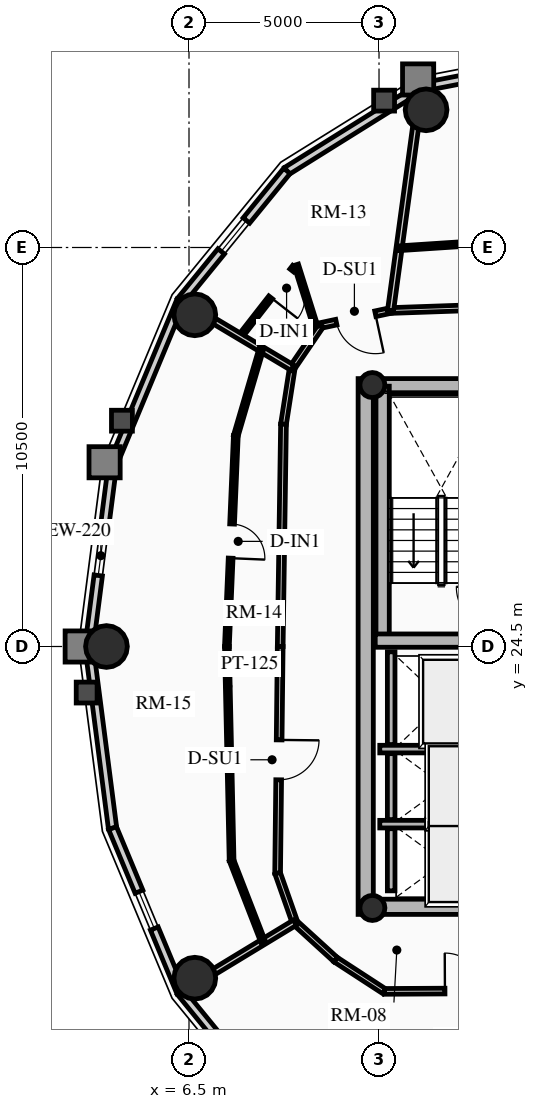
"""IFC4 building model, lengths in metres.
Left out: names, types, materials, properties, quantities, classifications, styles, units other than length and angle.
Written with IfcOpenShell. Run it as: python <this file> out.ifc"""

import sys

from ifc_helpers import new_model, si_unit, direction, frame, frame_2d, origin, origin_2d, place, context, subcontext, project, spatial, rectangle, circle, hollow_circle, extrude, source, transform, mapped, element, fill, save


model = new_model("IFC4")
c1 = context("Model", 3, precision=1e-05, world=origin(), true_north=direction((0.0, 1.0)))
c2 = subcontext(c1, "Body", "Model", "MODEL_VIEW")
j1 = project(units=[si_unit("LENGTHUNIT", "METRE"), si_unit("PLANEANGLEUNIT", "RADIAN")], contexts=[c1])
p1 = place(None, origin())
s1 = spatial("IfcSite", under=j1, at=p1, CompositionType="ELEMENT")
p2 = place(p1, origin())
s2 = spatial("IfcBuilding", under=s1, at=p2, CompositionType="ELEMENT")
p3 = place(p2, frame((0.0, 0.0, 214.12)))
s3 = spatial("IfcBuildingStorey", under=s2, at=p3, CompositionType="ELEMENT", Elevation=214.12)
p4 = place(p3, frame((11.15, 17.45, 0.0), z_axis=(0.0, 0.0, 1.0), x_axis=(0.0, 1.0, 0.0)))
e1 = element("IfcWall", 1, at=p4, inside=s3, PredefinedType="SHEAR", context=c2, shape_type="SweptSolid", body=[
    extrude(rectangle(XDim=14.1, YDim=0.4, at=frame_2d((7.05, 0.0))), origin(), (0.0, 0.0, 1.0), 2.91),
])
p5 = place(p3, frame((11.15, 17.65, 0.0), z_axis=(0.0, 0.0, 1.0), x_axis=(1.0, 0.0, 0.0)))
e2 = element("IfcWall", 2, at=p5, inside=s3, PredefinedType="SHEAR", context=c2, shape_type="SweptSolid", body=[
    extrude(rectangle(XDim=10.7, YDim=0.4, at=frame_2d((5.35, 0.0))), origin(), (0.0, 0.0, 1.0), 2.91),
])
m1 = source(origin(), c2, "Body", "SweptSolid", [
    extrude(rectangle(XDim=1.5, YDim=2.02, at=frame_2d((0.75, 1.01))), frame((0.0, 0.21, 0.0), z_axis=(0.0, -1.0, 0.0), x_axis=(1.0, 0.0, 0.0)), (0.0, 0.0, 1.0), 0.42),
])
p6 = place(p5, frame((5.45, 0.0, 0.0)))
e3 = element("IfcOpeningElement", 3, at=p6, cuts=e2, PredefinedType="OPENING", context=c2, shape_type="MappedRepresentation", body=[
    mapped(m1, transform((0.0, 0.0, 0.0), x_axis=(1.0, 0.0, 0.0), y_axis=(0.0, 1.0, 0.0), z_axis=(0.0, 0.0, 1.0), scale=1.0)),
])
p7 = place(p3, frame((11.15, 31.35, 0.0), z_axis=(0.0, 0.0, 1.0), x_axis=(1.0, 0.0, 0.0)))
e4 = element("IfcWall", 4, at=p7, inside=s3, PredefinedType="SHEAR", context=c2, shape_type="SweptSolid", body=[
    extrude(rectangle(XDim=10.7, YDim=0.4, at=frame_2d((5.35, 0.0))), origin(), (0.0, 0.0, 1.0), 2.91),
])
p8 = place(p7, frame((4.6, 0.0, 0.0)))
e5 = element("IfcOpeningElement", 5, at=p8, cuts=e4, PredefinedType="OPENING", context=c2, shape_type="MappedRepresentation", body=[
    mapped(m1, transform((0.0, 0.0, 0.0), x_axis=(1.0, 0.0, 0.0), y_axis=(0.0, 1.0, 0.0), z_axis=(0.0, 0.0, 1.0), scale=1.0)),
])
p9 = place(p3, frame((11.595, 24.655, 0.0), z_axis=(0.0, 0.0, 1.0), x_axis=(0.0, 1.0, 0.0)))
e6 = element("IfcWall", 6, at=p9, inside=s3, PredefinedType="SHEAR", context=c2, shape_type="SweptSolid", body=[
    extrude(rectangle(XDim=6.695, YDim=0.35, at=frame_2d((3.348, 0.0))), origin(), (0.0, 0.0, 1.0), 2.91),
])
p10 = place(p3, frame((11.4, 24.655, 0.0), z_axis=(0.0, 0.0, 1.0), x_axis=(1.0, 0.0, 0.0)))
e7 = element("IfcWall", 7, at=p10, inside=s3, PredefinedType="SHEAR", context=c2, shape_type="SweptSolid", body=[
    extrude(rectangle(XDim=3.285, YDim=0.35, at=frame_2d((1.643, 0.0))), origin(), (0.0, 0.0, 1.0), 2.91),
])
for number, where, z_axis, x_axis in (
    (8, (11.325, 17.62, 0.0), (0.0, 0.0, 1.0), (1.0, 0.0, 0.0)),
    (9, (11.325, 31.38, 0.0), (0.0, 0.0, 1.0), (1.0, 0.0, 0.0)),
):
    element("IfcColumn", number, at=place(p3, frame(where, z_axis=z_axis, x_axis=x_axis)), inside=s3, PredefinedType="COLUMN", context=c2, shape_type="SweptSolid", body=[
        extrude(hollow_circle(Radius=0.33, WallThickness=0.025, at=origin_2d()), origin(), (0.0, 0.0, 1.0), 2.91),
    ])
for number, where, z_axis, x_axis in (
    (10, (12.739, 38.623, 0.0), (0.0, 0.0, 1.0), (1.0, 0.0, 0.0)),
    (11, (6.653, 33.229, 0.0), (0.0, 0.0, 1.0), (1.0, 0.0, 0.0)),
    (12, (4.328, 24.5, 0.0), (0.0, 0.0, 1.0), (1.0, 0.0, 0.0)),
    (13, (6.653, 15.771, 0.0), (0.0, 0.0, 1.0), (1.0, 0.0, 0.0)),
):
    element("IfcColumn", number, at=place(p3, frame(where, z_axis=z_axis, x_axis=x_axis)), inside=s3, PredefinedType="USERDEFINED", context=c2, shape_type="SweptSolid", body=[
        extrude(circle(Radius=0.55, at=origin_2d()), origin(), (0.0, 0.0, 1.0), 2.91),
    ])
p11 = place(p3, frame((12.597, 39.213, 0.0), z_axis=(0.0, 0.0, 1.0), x_axis=(0.981700307484, 0.190432419211, 0.0)))
e14 = element("IfcWall", 14, at=p11, inside=s3, PredefinedType="SOLIDWALL", context=c2, shape_type="SweptSolid", body=[
    extrude(rectangle(XDim=3.976, YDim=0.22, at=frame_2d((1.988, 0.0))), origin(), (0.0, 0.0, 1.0), 2.322),
])
m2 = source(origin(), c2, "Body", "SweptSolid", [
    extrude(rectangle(XDim=1.05, YDim=1.3, at=frame_2d((0.525, 0.65))), frame((0.0, 0.12, 0.0), z_axis=(0.0, -1.0, 0.0), x_axis=(1.0, 0.0, 0.0)), (0.0, 0.0, 1.0), 0.24),
])
p12 = place(p11, frame((1.463, 0.0, 0.65)))
e15 = element("IfcOpeningElement", 15, at=p12, cuts=e14, PredefinedType="OPENING", context=c2, shape_type="MappedRepresentation", body=[
    mapped(m2, transform((0.0, 0.0, 0.0), x_axis=(1.0, 0.0, 0.0), y_axis=(0.0, 1.0, 0.0), z_axis=(0.0, 0.0, 1.0), scale=1.0)),
])
p13 = place(p3, frame((9.076, 37.015, 0.0), z_axis=(0.0, 0.0, 1.0), x_axis=(0.848318713376, 0.529485939886, 0.0)))
e16 = element("IfcWall", 16, at=p13, inside=s3, PredefinedType="SOLIDWALL", context=c2, shape_type="SweptSolid", body=[
    extrude(rectangle(XDim=4.15, YDim=0.22, at=frame_2d((2.075, 0.0))), origin(), (0.0, 0.0, 1.0), 2.322),
])
p14 = place(p3, frame((6.282, 33.593, 0.0), z_axis=(0.0, 0.0, 1.0), x_axis=(0.632467166636, 0.774587169483, 0.0)))
e17 = element("IfcWall", 17, at=p14, inside=s3, PredefinedType="SOLIDWALL", context=c2, shape_type="SweptSolid", body=[
    extrude(rectangle(XDim=4.418, YDim=0.22, at=frame_2d((2.209, 0.0))), origin(), (0.0, 0.0, 1.0), 2.322),
])
p15 = place(p14, frame((1.684, 0.0, 0.65)))
e18 = element("IfcOpeningElement", 18, at=p15, cuts=e17, PredefinedType="OPENING", context=c2, shape_type="MappedRepresentation", body=[
    mapped(m2, transform((0.0, 0.0, 0.0), x_axis=(1.0, 0.0, 0.0), y_axis=(0.0, 1.0, 0.0), z_axis=(0.0, 0.0, 1.0), scale=1.0)),
])
p16 = place(p3, frame((4.488, 29.281, 0.0), z_axis=(0.0, 0.0, 1.0), x_axis=(0.384036305194, 0.923317993052, 0.0)))
e19 = element("IfcWall", 19, at=p16, inside=s3, PredefinedType="SOLIDWALL", context=c2, shape_type="SweptSolid", body=[
    extrude(rectangle(XDim=4.671, YDim=0.22, at=frame_2d((2.335, 0.0))), origin(), (0.0, 0.0, 1.0), 2.322),
])
p17 = place(p3, frame((3.87, 24.5, 0.0), z_axis=(0.0, 0.0, 1.0), x_axis=(0.128241318541, 0.991742993027, 0.0)))
e20 = element("IfcWall", 20, at=p17, inside=s3, PredefinedType="SOLIDWALL", context=c2, shape_type="SweptSolid", body=[
    extrude(rectangle(XDim=4.82, YDim=0.22, at=frame_2d((2.41, 0.0))), origin(), (0.0, 0.0, 1.0), 2.322),
])
p18 = place(p17, frame((1.885, 0.0, 0.65)))
e21 = element("IfcOpeningElement", 21, at=p18, cuts=e20, PredefinedType="OPENING", context=c2, shape_type="MappedRepresentation", body=[
    mapped(m2, transform((0.0, 0.0, 0.0), x_axis=(1.0, 0.0, 0.0), y_axis=(0.0, 1.0, 0.0), z_axis=(0.0, 0.0, 1.0), scale=1.0)),
])
p19 = place(p3, frame((4.488, 19.719, 0.0), z_axis=(0.0, 0.0, 1.0), x_axis=(-0.128241318541, 0.991742993027, 0.0)))
e22 = element("IfcWall", 22, at=p19, inside=s3, PredefinedType="SOLIDWALL", context=c2, shape_type="SweptSolid", body=[
    extrude(rectangle(XDim=4.82, YDim=0.22, at=frame_2d((2.41, 0.0))), origin(), (0.0, 0.0, 1.0), 2.322),
])
p20 = place(p3, frame((6.282, 15.407, 0.0), z_axis=(0.0, 0.0, 1.0), x_axis=(-0.384036305194, 0.923317993052, 0.0)))
e23 = element("IfcWall", 23, at=p20, inside=s3, PredefinedType="SOLIDWALL", context=c2, shape_type="SweptSolid", body=[
    extrude(rectangle(XDim=4.671, YDim=0.22, at=frame_2d((2.335, 0.0))), origin(), (0.0, 0.0, 1.0), 2.322),
])
p21 = place(p20, frame((1.81, 0.0, 0.65)))
e24 = element("IfcOpeningElement", 24, at=p21, cuts=e23, PredefinedType="OPENING", context=c2, shape_type="MappedRepresentation", body=[
    mapped(m2, transform((0.0, 0.0, 0.0), x_axis=(1.0, 0.0, 0.0), y_axis=(0.0, 1.0, 0.0), z_axis=(0.0, 0.0, 1.0), scale=1.0)),
])
p22 = place(p3, frame((9.076, 11.985, 0.0), z_axis=(0.0, 0.0, 1.0), x_axis=(-0.632467166636, 0.774587169483, 0.0)))
e25 = element("IfcWall", 25, at=p22, inside=s3, PredefinedType="SOLIDWALL", context=c2, shape_type="SweptSolid", body=[
    extrude(rectangle(XDim=4.418, YDim=0.22, at=frame_2d((2.209, 0.0))), origin(), (0.0, 0.0, 1.0), 2.322),
])
p23 = place(p3, frame((11.52, 21.8, 0.0), z_axis=(0.0, 0.0, 1.0), x_axis=(1.0, 0.0, 0.0)))
e26 = element("IfcWall", 26, at=p23, inside=s3, PredefinedType="SHEAR", context=c2, shape_type="SweptSolid", body=[
    extrude(rectangle(XDim=2.97, YDim=0.2, at=frame_2d((1.485, 0.0))), origin(), (0.0, 0.0, 1.0), 2.91),
])
p24 = place(p3, frame((11.82, 21.92, 0.0), z_axis=(0.0, 0.0, 1.0), x_axis=(0.0, 1.0, 0.0)))
e27 = element("IfcWall", 27, at=p24, inside=s3, PredefinedType="SHEAR", context=c2, shape_type="SweptSolid", body=[
    extrude(rectangle(XDim=2.44, YDim=0.2, at=frame_2d((1.22, 0.0))), origin(), (0.0, 0.0, 1.0), 2.91),
])
p25 = place(p3, frame((11.52, 19.825, 0.0), z_axis=(0.0, 0.0, 1.0), x_axis=(1.0, 0.0, 0.0)))
e28 = element("IfcWall", 28, at=p25, inside=s3, PredefinedType="SHEAR", context=c2, shape_type="SweptSolid", body=[
    extrude(rectangle(XDim=2.97, YDim=0.2, at=frame_2d((1.485, 0.0))), origin(), (0.0, 0.0, 1.0), 2.91),
])
p26 = place(p3, frame((11.82, 19.945, 0.0), z_axis=(0.0, 0.0, 1.0), x_axis=(0.0, 1.0, 0.0)))
e29 = element("IfcWall", 29, at=p26, inside=s3, PredefinedType="SHEAR", context=c2, shape_type="SweptSolid", body=[
    extrude(rectangle(XDim=1.735, YDim=0.2, at=frame_2d((0.867, 0.0))), origin(), (0.0, 0.0, 1.0), 2.91),
])
p27 = place(p3, frame((11.82, 18.07, 0.0), z_axis=(0.0, 0.0, 1.0), x_axis=(0.0, 1.0, 0.0)))
e30 = element("IfcWall", 30, at=p27, inside=s3, PredefinedType="SHEAR", context=c2, shape_type="SweptSolid", body=[
    extrude(rectangle(XDim=1.635, YDim=0.2, at=frame_2d((0.817, 0.0))), origin(), (0.0, 0.0, 1.0), 2.91),
])
p28 = place(p3, frame((18.082, 33.56, 0.0), z_axis=(0.0, 0.0, 1.0), x_axis=(-0.999399009709, -0.034664382185, 0.0)))
e31 = element("IfcWall", 31, at=p28, inside=s3, PredefinedType="PARTITIONING", context=c2, shape_type="SweptSolid", body=[
    extrude(rectangle(XDim=6.282, YDim=0.15, at=frame_2d((3.141, 0.0))), origin(), (0.0, 0.0, 1.0), 2.255),
])
p29 = place(p3, frame((11.803, 33.342, 0.0), z_axis=(0.0, 0.0, 1.0), x_axis=(-0.977750742783, -0.209770076483, 0.0)))
e32 = element("IfcWall", 32, at=p29, inside=s3, PredefinedType="PARTITIONING", context=c2, shape_type="SweptSolid", body=[
    extrude(rectangle(XDim=1.868, YDim=0.15, at=frame_2d((0.934, 0.0))), origin(), (0.0, 0.0, 1.0), 2.255),
])
m3 = source(origin(), c2, "Body", "SweptSolid", [
    extrude(rectangle(XDim=1.05, YDim=2.015, at=frame_2d((0.525, 1.007))), frame((0.0, 0.085, 0.0), z_axis=(0.0, -1.0, 0.0), x_axis=(1.0, 0.0, 0.0)), (0.0, 0.0, 1.0), 0.17),
])
p30 = place(p29, frame((0.409, 0.0, 0.0)))
e33 = element("IfcOpeningElement", 33, at=p30, cuts=e32, PredefinedType="OPENING", context=c2, shape_type="MappedRepresentation", body=[
    mapped(m3, transform((0.0, 0.0, 0.0), x_axis=(1.0, 0.0, 0.0), y_axis=(0.0, 1.0, 0.0), z_axis=(0.0, 0.0, 1.0), scale=1.0)),
])
p31 = place(p3, frame((9.977, 32.95, 0.0), z_axis=(0.0, 0.0, 1.0), x_axis=(-0.563291804539, -0.826258036535, 0.0)))
e34 = element("IfcWall", 34, at=p31, inside=s3, PredefinedType="PARTITIONING", context=c2, shape_type="SweptSolid", body=[
    extrude(rectangle(XDim=1.346, YDim=0.15, at=frame_2d((0.673, 0.0))), origin(), (0.0, 0.0, 1.0), 2.322),
])
p32 = place(p3, frame((9.219, 31.838, 0.0), z_axis=(0.0, 0.0, 1.0), x_axis=(-0.154065528966, -0.98806063214, 0.0)))
e35 = element("IfcWall", 35, at=p32, inside=s3, PredefinedType="PARTITIONING", context=c2, shape_type="SweptSolid", body=[
    extrude(rectangle(XDim=1.507, YDim=0.15, at=frame_2d((0.753, 0.0))), origin(), (0.0, 0.0, 1.0), 2.255),
])
p33 = place(p3, frame((8.986, 30.349, 0.0), z_axis=(0.0, 0.0, 1.0), x_axis=(-0.014775478218, -0.999890836663, 0.0)))
e36 = element("IfcWall", 36, at=p33, inside=s3, PredefinedType="PARTITIONING", context=c2, shape_type="SweptSolid", body=[
    extrude(rectangle(XDim=5.849, YDim=0.15, at=frame_2d((2.925, 0.0))), origin(), (0.0, 0.0, 1.0), 2.685),
])
p34 = place(p3, frame((8.9, 24.5, 0.0), z_axis=(0.0, 0.0, 1.0), x_axis=(-0.011416369353, -0.999934831132, 0.0)))
e37 = element("IfcWall", 37, at=p34, inside=s3, PredefinedType="PARTITIONING", context=c2, shape_type="SweptSolid", body=[
    extrude(rectangle(XDim=5.967, YDim=0.15, at=frame_2d((2.983, 0.0))), origin(), (0.0, 0.0, 1.0), 2.322),
])
p35 = place(p34, frame((2.458, 0.0, 0.0)))
e38 = element("IfcOpeningElement", 38, at=p35, cuts=e37, PredefinedType="OPENING", context=c2, shape_type="MappedRepresentation", body=[
    mapped(m3, transform((0.0, 0.0, 0.0), x_axis=(1.0, 0.0, 0.0), y_axis=(0.0, 1.0, 0.0), z_axis=(0.0, 0.0, 1.0), scale=1.0)),
])
p36 = place(p3, frame((8.832, 18.534, 0.0), z_axis=(0.0, 0.0, 1.0), x_axis=(0.332031819657, -0.943268186008, 0.0)))
e39 = element("IfcWall", 39, at=p36, inside=s3, PredefinedType="PARTITIONING", context=c2, shape_type="SweptSolid", body=[
    extrude(rectangle(XDim=1.377, YDim=0.15, at=frame_2d((0.688, 0.0))), origin(), (0.0, 0.0, 1.0), 2.255),
])
p37 = place(p3, frame((9.289, 17.235, 0.0), z_axis=(0.0, 0.0, 1.0), x_axis=(0.739015164946, -0.673688790155, 0.0)))
e40 = element("IfcWall", 40, at=p37, inside=s3, PredefinedType="PARTITIONING", context=c2, shape_type="SweptSolid", body=[
    extrude(rectangle(XDim=1.446, YDim=0.15, at=frame_2d((0.723, 0.0))), origin(), (0.0, 0.0, 1.0), 2.322),
])
p38 = place(p3, frame((10.358, 16.26, 0.0), z_axis=(0.0, 0.0, 1.0), x_axis=(0.838265397059, -0.545262435983, 0.0)))
e41 = element("IfcWall", 41, at=p38, inside=s3, PredefinedType="PARTITIONING", context=c2, shape_type="SweptSolid", body=[
    extrude(rectangle(XDim=1.534, YDim=0.15, at=frame_2d((0.767, 0.0))), origin(), (0.0, 0.0, 1.0), 2.255),
])
p39 = place(p3, frame((11.644, 15.424, 0.0), z_axis=(0.0, 0.0, 1.0), x_axis=(0.999986552511, 0.005186019339, 0.0)))
e42 = element("IfcWall", 42, at=p39, inside=s3, PredefinedType="PARTITIONING", context=c2, shape_type="SweptSolid", body=[
    extrude(rectangle(XDim=3.201, YDim=0.15, at=frame_2d((1.601, 0.0))), origin(), (0.0, 0.0, 1.0), 2.322),
])
m4 = source(origin(), c2, "Body", "SweptSolid", [
    extrude(rectangle(XDim=1.0, YDim=2.015, at=frame_2d((0.5, 1.007))), frame((0.0, 0.085, 0.0), z_axis=(0.0, -1.0, 0.0), x_axis=(1.0, 0.0, 0.0)), (0.0, 0.0, 1.0), 0.17),
])
p40 = place(p39, frame((1.591, 0.0, 0.0)))
e43 = element("IfcOpeningElement", 43, at=p40, cuts=e42, PredefinedType="OPENING", context=c2, shape_type="MappedRepresentation", body=[
    mapped(m4, transform((0.0, 0.0, 0.0), x_axis=(1.0, 0.0, 0.0), y_axis=(0.0, 1.0, 0.0), z_axis=(0.0, 0.0, 1.0), scale=1.0)),
])
p41 = place(p3, frame((11.803, 33.342, 0.0), z_axis=(0.0, 0.0, 1.0), x_axis=(0.135452591041, 0.990783828885, 0.0)))
e44 = element("IfcWall", 44, at=p41, inside=s3, PredefinedType="PARTITIONING", context=c2, shape_type="SweptSolid", body=[
    extrude(rectangle(XDim=5.906, YDim=0.16, at=frame_2d((2.953, 0.0))), origin(), (0.0, 0.0, 1.0), 2.322),
])
p42 = place(p3, frame((9.219, 31.838, 0.0), z_axis=(0.0, 0.0, 1.0), x_axis=(-0.858586714977, 0.512668365384, 0.0)))
e45 = element("IfcWall", 45, at=p42, inside=s3, PredefinedType="PARTITIONING", context=c2, shape_type="SweptSolid", body=[
    extrude(rectangle(XDim=3.401, YDim=0.16, at=frame_2d((1.701, 0.0))), origin(), (0.0, 0.0, 1.0), 2.322),
])
p43 = place(p3, frame((9.289, 17.235, 0.0), z_axis=(0.0, 0.0, 1.0), x_axis=(-0.854741081983, -0.519054604806, 0.0)))
e46 = element("IfcWall", 46, at=p43, inside=s3, PredefinedType="PARTITIONING", context=c2, shape_type="SweptSolid", body=[
    extrude(rectangle(XDim=3.499, YDim=0.16, at=frame_2d((1.75, 0.0))), origin(), (0.0, 0.0, 1.0), 2.322),
])
p44 = place(p3, frame((17.639, 35.349, 0.0), z_axis=(0.0, 0.0, 1.0), x_axis=(-0.997849042159, -0.065553711275, 0.0)))
e47 = element("IfcWall", 47, at=p44, inside=s3, PredefinedType="PARTITIONING", context=c2, shape_type="SweptSolid", body=[
    extrude(rectangle(XDim=5.624, YDim=0.125, at=frame_2d((2.812, 0.0))), origin(), (0.0, 0.0, 1.0), 2.255),
])
m5 = source(origin(), c2, "Body", "SweptSolid", [
    extrude(rectangle(XDim=0.9, YDim=2.005, at=frame_2d((0.45, 1.002))), frame((0.0, 0.073, 0.0), z_axis=(0.0, -1.0, 0.0), x_axis=(1.0, 0.0, 0.0)), (0.0, 0.0, 1.0), 0.145),
])
p45 = place(p44, frame((2.362, 0.0, 0.0)))
e48 = element("IfcOpeningElement", 48, at=p45, cuts=e47, PredefinedType="OPENING", context=c2, shape_type="MappedRepresentation", body=[
    mapped(m5, transform((0.0, 0.0, 0.0), x_axis=(1.0, 0.0, 0.0), y_axis=(0.0, 1.0, 0.0), z_axis=(0.0, 0.0, 1.0), scale=1.0)),
])
p46 = place(p3, frame((9.835, 32.906, 0.0), z_axis=(0.0, 0.0, 1.0), x_axis=(-0.300376803481, 0.953820620416, 0.0)))
e49 = element("IfcWall", 49, at=p46, inside=s3, PredefinedType="PARTITIONING", context=c2, shape_type="SweptSolid", body=[
    extrude(rectangle(XDim=1.719, YDim=0.125, at=frame_2d((0.859, 0.0))), origin(), (0.0, 0.0, 1.0), 2.685),
])
p47 = place(p3, frame((9.276, 34.491, 0.0), z_axis=(0.0, 0.0, 1.0), x_axis=(-0.615039973806, -0.788495929362, 0.0)))
e50 = element("IfcWall", 50, at=p47, inside=s3, PredefinedType="PARTITIONING", context=c2, shape_type="SweptSolid", body=[
    extrude(rectangle(XDim=2.228, YDim=0.125, at=frame_2d((1.114, 0.0))), origin(), (0.0, 0.0, 1.0), 2.322),
])
p48 = place(p47, frame((0.12, 0.0, 0.0)))
e51 = element("IfcOpeningElement", 51, at=p48, cuts=e50, PredefinedType="OPENING", context=c2, shape_type="MappedRepresentation", body=[
    mapped(m5, transform((0.0, 0.0, 0.0), x_axis=(1.0, 0.0, 0.0), y_axis=(0.0, 1.0, 0.0), z_axis=(0.0, 0.0, 1.0), scale=1.0)),
])
p49 = place(p3, frame((8.401, 32.326, 0.0), z_axis=(0.0, 0.0, 1.0), x_axis=(-0.281681886596, -0.959507850288, 0.0)))
e52 = element("IfcWall", 52, at=p49, inside=s3, PredefinedType="PARTITIONING", context=c2, shape_type="SweptSolid", body=[
    extrude(rectangle(XDim=2.374, YDim=0.125, at=frame_2d((1.187, 0.0))), origin(), (0.0, 0.0, 1.0), 2.255),
])
p50 = place(p3, frame((7.732, 30.048, 0.0), z_axis=(0.0, 0.0, 1.0), x_axis=(-0.042296211955, -0.999105114817, 0.0)))
e53 = element("IfcWall", 53, at=p50, inside=s3, PredefinedType="PARTITIONING", context=c2, shape_type="SweptSolid", body=[
    extrude(rectangle(XDim=5.553, YDim=0.125, at=frame_2d((2.776, 0.0))), origin(), (0.0, 0.0, 1.0), 2.685),
])
p51 = place(p50, frame((2.326, 0.0, 0.0)))
e54 = element("IfcOpeningElement", 54, at=p51, cuts=e53, PredefinedType="OPENING", context=c2, shape_type="MappedRepresentation", body=[
    mapped(m5, transform((0.0, 0.0, 0.0), x_axis=(1.0, 0.0, 0.0), y_axis=(0.0, 1.0, 0.0), z_axis=(0.0, 0.0, 1.0), scale=1.0)),
])
p52 = place(p3, frame((7.497, 24.5, 0.0), z_axis=(0.0, 0.0, 1.0), x_axis=(0.021927972859, -0.999759553096, 0.0)))
e55 = element("IfcWall", 55, at=p52, inside=s3, PredefinedType="PARTITIONING", context=c2, shape_type="SweptSolid", body=[
    extrude(rectangle(XDim=5.634, YDim=0.125, at=frame_2d((2.817, 0.0))), origin(), (0.0, 0.0, 1.0), 2.322),
])
p53 = place(p3, frame((7.621, 18.868, 0.0), z_axis=(0.0, 0.0, 1.0), x_axis=(0.361712646649, -0.93228963378, 0.0)))
e56 = element("IfcWall", 56, at=p53, inside=s3, PredefinedType="PARTITIONING", context=c2, shape_type="SweptSolid", body=[
    extrude(rectangle(XDim=2.297, YDim=0.125, at=frame_2d((1.148, 0.0))), origin(), (0.0, 0.0, 1.0), 2.255),
])
m6 = source(origin(), c2, "Body", "SweptSolid", [
    extrude(rectangle(XDim=1.05, YDim=1.3, at=frame_2d((0.525, 0.65))), frame((0.0, 0.03, 0.0), z_axis=(0.0, -1.0, 0.0), x_axis=(1.0, 0.0, 0.0)), (0.0, 0.0, 1.0), 0.06),
])
p54 = place(p15, origin())
e57 = element("IfcWindow", 57, at=p54, inside=s3, PartitioningType="SINGLE_PANEL", PredefinedType="WINDOW", context=c2, shape_type="MappedRepresentation", body=[
    mapped(m6, transform((0.0, 0.0, 0.0), x_axis=(1.0, 0.0, 0.0), y_axis=(0.0, 1.0, 0.0), z_axis=(0.0, 0.0, 1.0), scale=1.0)),
])
fill(e18, e57)
p55 = place(p18, origin())
e58 = element("IfcWindow", 58, at=p55, inside=s3, PartitioningType="SINGLE_PANEL", PredefinedType="WINDOW", context=c2, shape_type="MappedRepresentation", body=[
    mapped(m6, transform((0.0, 0.0, 0.0), x_axis=(1.0, 0.0, 0.0), y_axis=(0.0, 1.0, 0.0), z_axis=(0.0, 0.0, 1.0), scale=1.0)),
])
fill(e21, e58)
p56 = place(p21, origin())
e59 = element("IfcWindow", 59, at=p56, inside=s3, PartitioningType="SINGLE_PANEL", PredefinedType="WINDOW", context=c2, shape_type="MappedRepresentation", body=[
    mapped(m6, transform((0.0, 0.0, 0.0), x_axis=(1.0, 0.0, 0.0), y_axis=(0.0, 1.0, 0.0), z_axis=(0.0, 0.0, 1.0), scale=1.0)),
])
fill(e24, e59)
m7 = source(origin(), c2, "Body", "SweptSolid", [
    extrude(rectangle(XDim=1.05, YDim=2.015, at=frame_2d((0.525, 1.007))), frame((0.0, 0.025, 0.0), z_axis=(0.0, -1.0, 0.0), x_axis=(1.0, 0.0, 0.0)), (0.0, 0.0, 1.0), 0.05),
])
p57 = place(p30, origin())
e60 = element("IfcDoor", 60, at=p57, inside=s3, OperationType="SINGLE_SWING_LEFT", PredefinedType="DOOR", context=c2, shape_type="MappedRepresentation", body=[
    mapped(m7, transform((0.0, 0.0, 0.0), x_axis=(1.0, 0.0, 0.0), y_axis=(0.0, 1.0, 0.0), z_axis=(0.0, 0.0, 1.0), scale=1.0)),
])
fill(e33, e60)
m8 = source(origin(), c2, "Body", "SweptSolid", [
    extrude(rectangle(XDim=0.9, YDim=2.005, at=frame_2d((0.45, 1.002))), frame((0.0, 0.025, 0.0), z_axis=(0.0, -1.0, 0.0), x_axis=(1.0, 0.0, 0.0)), (0.0, 0.0, 1.0), 0.05),
])
p58 = place(p48, origin())
e61 = element("IfcDoor", 61, at=p58, inside=s3, OperationType="SINGLE_SWING_RIGHT", PredefinedType="DOOR", context=c2, shape_type="MappedRepresentation", body=[
    mapped(m8, transform((0.0, 0.0, 0.0), x_axis=(1.0, 0.0, 0.0), y_axis=(0.0, 1.0, 0.0), z_axis=(0.0, 0.0, 1.0), scale=1.0)),
])
fill(e51, e61)
p59 = place(p35, origin())
e62 = element("IfcDoor", 62, at=p59, inside=s3, OperationType="SINGLE_SWING_LEFT", PredefinedType="DOOR", context=c2, shape_type="MappedRepresentation", body=[
    mapped(m7, transform((0.0, 0.0, 0.0), x_axis=(1.0, 0.0, 0.0), y_axis=(0.0, 1.0, 0.0), z_axis=(0.0, 0.0, 1.0), scale=1.0)),
])
fill(e38, e62)
p60 = place(p51, origin())
e63 = element("IfcDoor", 63, at=p60, inside=s3, OperationType="SINGLE_SWING_RIGHT", PredefinedType="DOOR", context=c2, shape_type="MappedRepresentation", body=[
    mapped(m8, transform((0.0, 0.0, 0.0), x_axis=(1.0, 0.0, 0.0), y_axis=(0.0, 1.0, 0.0), z_axis=(0.0, 0.0, 1.0), scale=1.0)),
])
fill(e54, e63)
m9 = source(origin(), c2, "Body", "SweptSolid", [
    extrude(rectangle(XDim=1.0, YDim=2.015, at=frame_2d((0.5, 1.007))), frame((0.0, 0.025, 0.0), z_axis=(0.0, -1.0, 0.0), x_axis=(1.0, 0.0, 0.0)), (0.0, 0.0, 1.0), 0.05),
])
p61 = place(p40, origin())
e64 = element("IfcDoor", 64, at=p61, inside=s3, OperationType="SINGLE_SWING_LEFT", PredefinedType="DOOR", context=c2, shape_type="MappedRepresentation", body=[
    mapped(m9, transform((0.0, 0.0, 0.0), x_axis=(1.0, 0.0, 0.0), y_axis=(0.0, 1.0, 0.0), z_axis=(0.0, 0.0, 1.0), scale=1.0)),
])
fill(e43, e64)
save(model, sys.argv[1])
